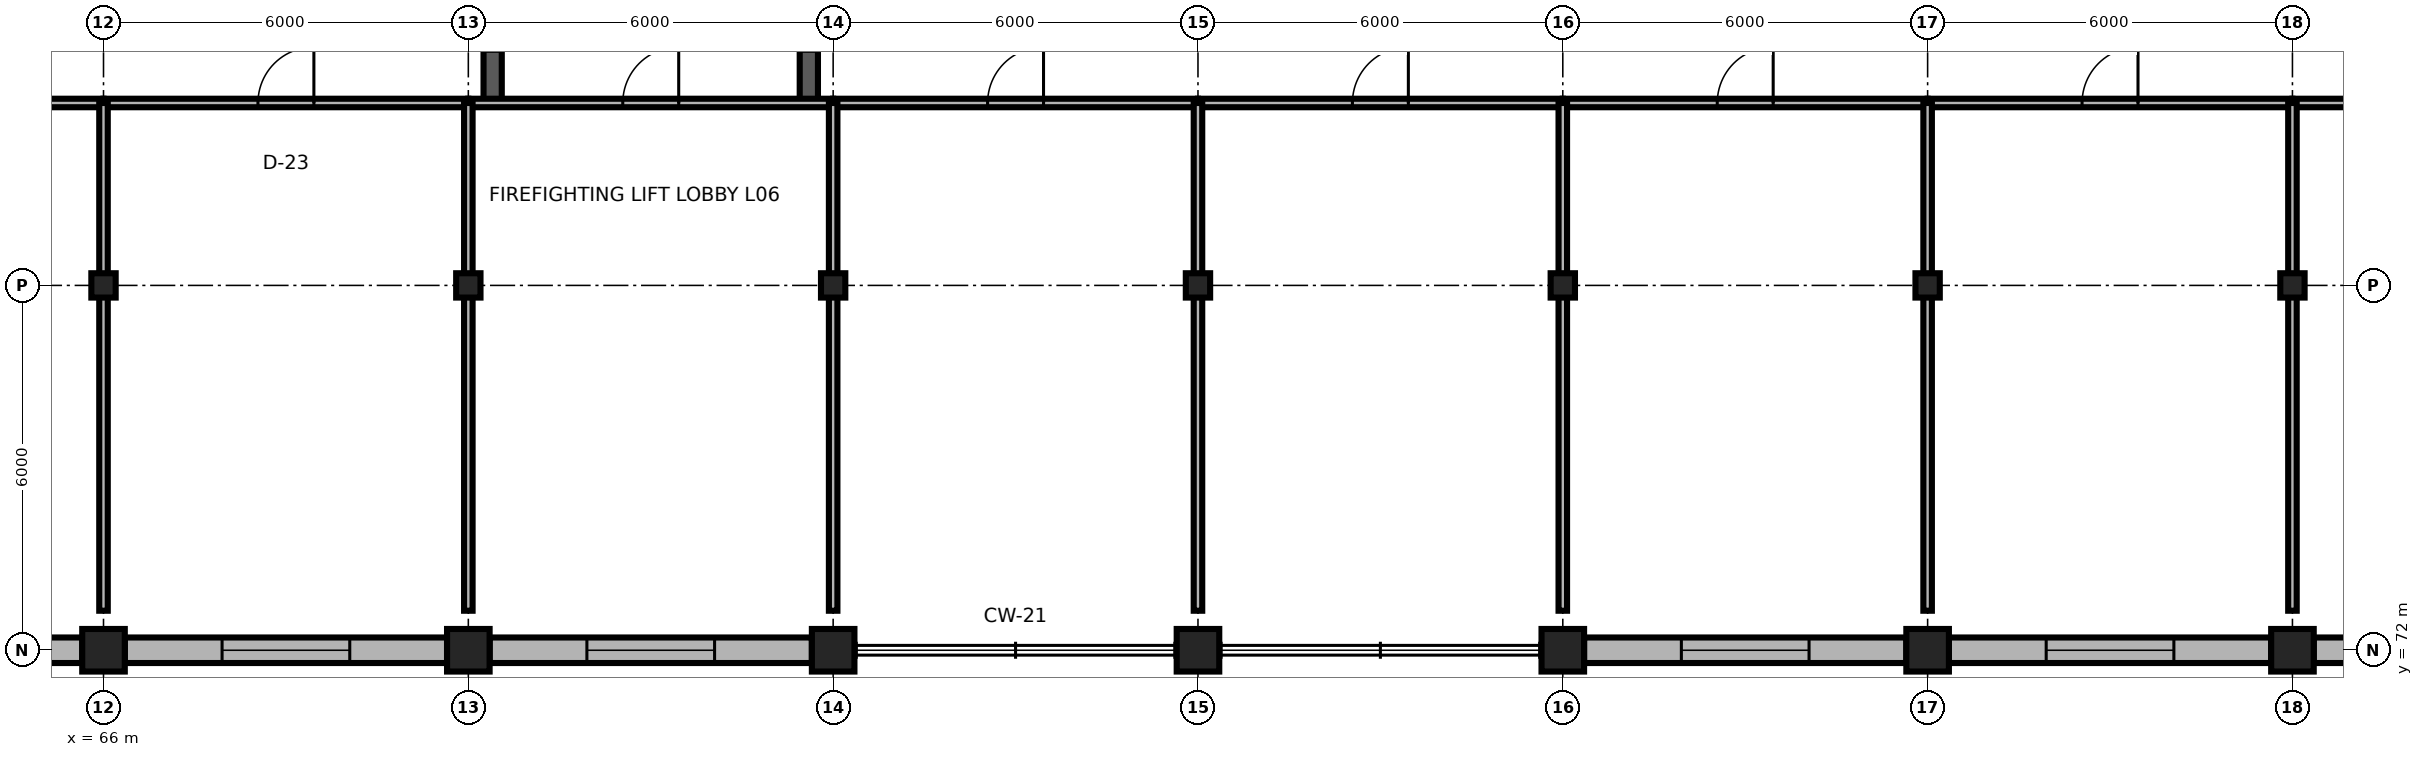
"""IFC4 building model, lengths in metres.
Left out: names, types, materials, properties, quantities, classifications, styles, units other than length and angle.
Written with IfcOpenShell. Run it as: python <this file> out.ifc"""

import sys

from ifc_helpers import new_model, si_unit, direction, frame, frame_2d, origin, origin_2d, place, context, subcontext, project, spatial, rectangle, i_section, extrude, element, fill, save


model = new_model("IFC4")
c1 = context("Model", 3, precision=1e-05, world=origin(), true_north=direction((0.0, 1.0)))
c2 = subcontext(c1, "Body", "Model", "MODEL_VIEW")
j1 = project(units=[si_unit("LENGTHUNIT", "METRE"), si_unit("PLANEANGLEUNIT", "RADIAN")], contexts=[c1])
p1 = place(None, origin())
s1 = spatial("IfcSite", under=j1, at=p1, CompositionType="ELEMENT")
p2 = place(p1, origin())
s2 = spatial("IfcBuilding", under=s1, at=p2, CompositionType="ELEMENT")
p3 = place(p2, frame((0.0, 0.0, 24.9)))
s3 = spatial("IfcBuildingStorey", under=s2, at=p3, CompositionType="ELEMENT", Elevation=24.9)
for number, where, z_axis, x_axis in (
    (1, (66.0, 72.0, 0.0), (0.0, 0.0, 1.0), (1.0, 0.0, 0.0)),
    (2, (72.0, 72.0, 0.0), (0.0, 0.0, 1.0), (1.0, 0.0, 0.0)),
    (3, (78.0, 72.0, 0.0), (0.0, 0.0, 1.0), (1.0, 0.0, 0.0)),
    (4, (84.0, 72.0, 0.0), (0.0, 0.0, 1.0), (1.0, 0.0, 0.0)),
    (5, (90.0, 72.0, 0.0), (0.0, 0.0, 1.0), (1.0, 0.0, 0.0)),
    (6, (96.0, 72.0, 0.0), (0.0, 0.0, 1.0), (1.0, 0.0, 0.0)),
    (7, (102.0, 72.0, 0.0), (0.0, 0.0, 1.0), (1.0, 0.0, 0.0)),
):
    element("IfcColumn", number, at=place(p3, frame(where, z_axis=z_axis, x_axis=x_axis)), inside=s3, PredefinedType="COLUMN", context=c2, shape_type="SweptSolid", body=[
        extrude(rectangle(XDim=0.7, YDim=0.7, at=origin_2d()), origin(), (0.0, 0.0, 1.0), 3.9),
    ])
for number, where, z_axis, x_axis in (
    (8, (66.0, 78.0, 0.0), (0.0, 0.0, 1.0), (1.0, 0.0, 0.0)),
    (9, (72.0, 78.0, 0.0), (0.0, 0.0, 1.0), (1.0, 0.0, 0.0)),
    (10, (78.0, 78.0, 0.0), (0.0, 0.0, 1.0), (1.0, 0.0, 0.0)),
    (11, (84.0, 78.0, 0.0), (0.0, 0.0, 1.0), (1.0, 0.0, 0.0)),
    (12, (90.0, 78.0, 0.0), (0.0, 0.0, 1.0), (1.0, 0.0, 0.0)),
    (13, (96.0, 78.0, 0.0), (0.0, 0.0, 1.0), (1.0, 0.0, 0.0)),
    (14, (102.0, 78.0, 0.0), (0.0, 0.0, 1.0), (1.0, 0.0, 0.0)),
):
    element("IfcColumn", number, at=place(p3, frame(where, z_axis=z_axis, x_axis=x_axis)), inside=s3, PredefinedType="COLUMN", context=c2, shape_type="SweptSolid", body=[
        extrude(i_section(OverallWidth=0.4, OverallDepth=0.4, WebThickness=0.013, FlangeThickness=0.021, FilletRadius=0.022, at=origin_2d()), origin(), (0.0, 0.0, 1.0), 3.9),
    ])
p4 = place(p3, frame((60.35, 72.0, 0.0), z_axis=(0.0, 0.0, 1.0), x_axis=(1.0, 0.0, 0.0)))
e15 = element("IfcWall", 15, at=p4, inside=s3, PredefinedType="SOLIDWALL", context=c2, shape_type="SweptSolid", body=[
    extrude(rectangle(XDim=5.3, YDim=0.42, at=frame_2d((2.65, 0.0))), origin(), (0.0, 0.0, 1.0), 3.32),
])
p5 = place(p4, frame((1.6, 0.0, 0.85)))
e16 = element("IfcOpeningElement", 16, at=p5, cuts=e15, PredefinedType="OPENING", context=c2, shape_type="SweptSolid", body=[
    extrude(rectangle(XDim=2.1, YDim=2.1, at=frame_2d((1.05, 1.05))), frame((0.0, 0.225, 0.0), z_axis=(0.0, -1.0, 0.0), x_axis=(1.0, 0.0, 0.0)), (0.0, 0.0, 1.0), 0.45),
])
p6 = place(p3, frame((66.35, 72.0, 0.0), z_axis=(0.0, 0.0, 1.0), x_axis=(1.0, 0.0, 0.0)))
e17 = element("IfcWall", 17, at=p6, inside=s3, PredefinedType="SOLIDWALL", context=c2, shape_type="SweptSolid", body=[
    extrude(rectangle(XDim=5.3, YDim=0.42, at=frame_2d((2.65, 0.0))), origin(), (0.0, 0.0, 1.0), 3.32),
])
p7 = place(p6, frame((1.6, 0.0, 0.85)))
e18 = element("IfcOpeningElement", 18, at=p7, cuts=e17, PredefinedType="OPENING", context=c2, shape_type="SweptSolid", body=[
    extrude(rectangle(XDim=2.1, YDim=2.1, at=frame_2d((1.05, 1.05))), frame((0.0, 0.225, 0.0), z_axis=(0.0, -1.0, 0.0), x_axis=(1.0, 0.0, 0.0)), (0.0, 0.0, 1.0), 0.45),
])
p8 = place(p3, frame((72.35, 72.0, 0.0), z_axis=(0.0, 0.0, 1.0), x_axis=(1.0, 0.0, 0.0)))
e19 = element("IfcWall", 19, at=p8, inside=s3, PredefinedType="SOLIDWALL", context=c2, shape_type="SweptSolid", body=[
    extrude(rectangle(XDim=5.3, YDim=0.42, at=frame_2d((2.65, 0.0))), origin(), (0.0, 0.0, 1.0), 3.32),
])
p9 = place(p8, frame((1.6, 0.0, 0.85)))
e20 = element("IfcOpeningElement", 20, at=p9, cuts=e19, PredefinedType="OPENING", context=c2, shape_type="SweptSolid", body=[
    extrude(rectangle(XDim=2.1, YDim=2.1, at=frame_2d((1.05, 1.05))), frame((0.0, 0.225, 0.0), z_axis=(0.0, -1.0, 0.0), x_axis=(1.0, 0.0, 0.0)), (0.0, 0.0, 1.0), 0.45),
])
p10 = place(p3, frame((90.35, 72.0, 0.0), z_axis=(0.0, 0.0, 1.0), x_axis=(1.0, 0.0, 0.0)))
e21 = element("IfcWall", 21, at=p10, inside=s3, PredefinedType="SOLIDWALL", context=c2, shape_type="SweptSolid", body=[
    extrude(rectangle(XDim=5.3, YDim=0.42, at=frame_2d((2.65, 0.0))), origin(), (0.0, 0.0, 1.0), 3.32),
])
p11 = place(p10, frame((1.6, 0.0, 0.85)))
e22 = element("IfcOpeningElement", 22, at=p11, cuts=e21, PredefinedType="OPENING", context=c2, shape_type="SweptSolid", body=[
    extrude(rectangle(XDim=2.1, YDim=2.1, at=frame_2d((1.05, 1.05))), frame((0.0, 0.225, 0.0), z_axis=(0.0, -1.0, 0.0), x_axis=(1.0, 0.0, 0.0)), (0.0, 0.0, 1.0), 0.45),
])
p12 = place(p3, frame((96.35, 72.0, 0.0), z_axis=(0.0, 0.0, 1.0), x_axis=(1.0, 0.0, 0.0)))
e23 = element("IfcWall", 23, at=p12, inside=s3, PredefinedType="SOLIDWALL", context=c2, shape_type="SweptSolid", body=[
    extrude(rectangle(XDim=5.3, YDim=0.42, at=frame_2d((2.65, 0.0))), origin(), (0.0, 0.0, 1.0), 3.32),
])
p13 = place(p12, frame((1.6, 0.0, 0.85)))
e24 = element("IfcOpeningElement", 24, at=p13, cuts=e23, PredefinedType="OPENING", context=c2, shape_type="SweptSolid", body=[
    extrude(rectangle(XDim=2.1, YDim=2.1, at=frame_2d((1.05, 1.05))), frame((0.0, 0.225, 0.0), z_axis=(0.0, -1.0, 0.0), x_axis=(1.0, 0.0, 0.0)), (0.0, 0.0, 1.0), 0.45),
])
p14 = place(p3, frame((102.35, 72.0, 0.0), z_axis=(0.0, 0.0, 1.0), x_axis=(1.0, 0.0, 0.0)))
e25 = element("IfcWall", 25, at=p14, inside=s3, PredefinedType="SOLIDWALL", context=c2, shape_type="SweptSolid", body=[
    extrude(rectangle(XDim=5.3, YDim=0.42, at=frame_2d((2.65, 0.0))), origin(), (0.0, 0.0, 1.0), 3.32),
])
p15 = place(p14, frame((1.6, 0.0, 0.85)))
e26 = element("IfcOpeningElement", 26, at=p15, cuts=e25, PredefinedType="OPENING", context=c2, shape_type="SweptSolid", body=[
    extrude(rectangle(XDim=2.1, YDim=2.1, at=frame_2d((1.05, 1.05))), frame((0.0, 0.225, 0.0), z_axis=(0.0, -1.0, 0.0), x_axis=(1.0, 0.0, 0.0)), (0.0, 0.0, 1.0), 0.45),
])
p16 = place(p3, frame((72.4, 81.0, 0.0), z_axis=(0.0, 0.0, 1.0), x_axis=(0.0, 1.0, 0.0)))
e27 = element("IfcWall", 27, at=p16, inside=s3, PredefinedType="SHEAR", context=c2, shape_type="SweptSolid", body=[
    extrude(rectangle(XDim=3.0, YDim=0.3, at=frame_2d((1.5, 0.0))), origin(), (0.0, 0.0, 1.0), 3.74),
])
p17 = place(p16, frame((0.85, 0.0, 0.0)))
e28 = element("IfcOpeningElement", 28, at=p17, cuts=e27, PredefinedType="OPENING", context=c2, shape_type="SweptSolid", body=[
    extrude(rectangle(XDim=1.3, YDim=2.2, at=frame_2d((0.65, 1.1))), frame((0.0, 0.165, 0.0), z_axis=(0.0, -1.0, 0.0), x_axis=(1.0, 0.0, 0.0)), (0.0, 0.0, 1.0), 0.33),
])
p18 = place(p3, frame((77.6, 81.0, 0.0), z_axis=(0.0, 0.0, 1.0), x_axis=(0.0, 1.0, 0.0)))
e29 = element("IfcWall", 29, at=p18, inside=s3, PredefinedType="SHEAR", context=c2, shape_type="SweptSolid", body=[
    extrude(rectangle(XDim=3.0, YDim=0.3, at=frame_2d((1.5, 0.0))), origin(), (0.0, 0.0, 1.0), 3.74),
])
p19 = place(p18, frame((0.85, 0.0, 0.0)))
e30 = element("IfcOpeningElement", 30, at=p19, cuts=e29, PredefinedType="OPENING", context=c2, shape_type="SweptSolid", body=[
    extrude(rectangle(XDim=1.3, YDim=2.2, at=frame_2d((0.65, 1.1))), frame((0.0, 0.165, 0.0), z_axis=(0.0, -1.0, 0.0), x_axis=(1.0, 0.0, 0.0)), (0.0, 0.0, 1.0), 0.33),
])
p20 = place(p3, frame((60.0, 81.0, 0.0), z_axis=(0.0, 0.0, 1.0), x_axis=(1.0, 0.0, 0.0)))
e31 = element("IfcWall", 31, at=p20, inside=s3, PredefinedType="PARTITIONING", context=c2, shape_type="SweptSolid", body=[
    extrude(rectangle(XDim=6.0, YDim=0.14, at=frame_2d((3.0, 0.0))), origin(), (0.0, 0.0, 1.0), 3.74),
])
p21 = place(p20, frame((2.54, 0.0, 0.0)))
e32 = element("IfcOpeningElement", 32, at=p21, cuts=e31, PredefinedType="OPENING", context=c2, shape_type="SweptSolid", body=[
    extrude(rectangle(XDim=0.92, YDim=2.15, at=frame_2d((0.46, 1.075))), frame((0.0, 0.085, 0.0), z_axis=(0.0, -1.0, 0.0), x_axis=(1.0, 0.0, 0.0)), (0.0, 0.0, 1.0), 0.17),
])
p22 = place(p3, frame((66.0, 81.0, 0.0), z_axis=(0.0, 0.0, 1.0), x_axis=(1.0, 0.0, 0.0)))
e33 = element("IfcWall", 33, at=p22, inside=s3, PredefinedType="PARTITIONING", context=c2, shape_type="SweptSolid", body=[
    extrude(rectangle(XDim=6.0, YDim=0.14, at=frame_2d((3.0, 0.0))), origin(), (0.0, 0.0, 1.0), 3.74),
])
p23 = place(p22, frame((2.54, 0.0, 0.0)))
e34 = element("IfcOpeningElement", 34, at=p23, cuts=e33, PredefinedType="OPENING", context=c2, shape_type="SweptSolid", body=[
    extrude(rectangle(XDim=0.92, YDim=2.15, at=frame_2d((0.46, 1.075))), frame((0.0, 0.085, 0.0), z_axis=(0.0, -1.0, 0.0), x_axis=(1.0, 0.0, 0.0)), (0.0, 0.0, 1.0), 0.17),
])
p24 = place(p3, frame((72.0, 81.0, 0.0), z_axis=(0.0, 0.0, 1.0), x_axis=(1.0, 0.0, 0.0)))
e35 = element("IfcWall", 35, at=p24, inside=s3, PredefinedType="PARTITIONING", context=c2, shape_type="SweptSolid", body=[
    extrude(rectangle(XDim=6.0, YDim=0.14, at=frame_2d((3.0, 0.0))), origin(), (0.0, 0.0, 1.0), 3.74),
])
p25 = place(p24, frame((2.54, 0.0, 0.0)))
e36 = element("IfcOpeningElement", 36, at=p25, cuts=e35, PredefinedType="OPENING", context=c2, shape_type="SweptSolid", body=[
    extrude(rectangle(XDim=0.92, YDim=2.15, at=frame_2d((0.46, 1.075))), frame((0.0, 0.085, 0.0), z_axis=(0.0, -1.0, 0.0), x_axis=(1.0, 0.0, 0.0)), (0.0, 0.0, 1.0), 0.17),
])
p26 = place(p3, frame((78.0, 81.0, 0.0), z_axis=(0.0, 0.0, 1.0), x_axis=(1.0, 0.0, 0.0)))
e37 = element("IfcWall", 37, at=p26, inside=s3, PredefinedType="PARTITIONING", context=c2, shape_type="SweptSolid", body=[
    extrude(rectangle(XDim=6.0, YDim=0.14, at=frame_2d((3.0, 0.0))), origin(), (0.0, 0.0, 1.0), 3.74),
])
p27 = place(p26, frame((2.54, 0.0, 0.0)))
e38 = element("IfcOpeningElement", 38, at=p27, cuts=e37, PredefinedType="OPENING", context=c2, shape_type="SweptSolid", body=[
    extrude(rectangle(XDim=0.92, YDim=2.15, at=frame_2d((0.46, 1.075))), frame((0.0, 0.085, 0.0), z_axis=(0.0, -1.0, 0.0), x_axis=(1.0, 0.0, 0.0)), (0.0, 0.0, 1.0), 0.17),
])
p28 = place(p3, frame((84.0, 81.0, 0.0), z_axis=(0.0, 0.0, 1.0), x_axis=(1.0, 0.0, 0.0)))
e39 = element("IfcWall", 39, at=p28, inside=s3, PredefinedType="PARTITIONING", context=c2, shape_type="SweptSolid", body=[
    extrude(rectangle(XDim=6.0, YDim=0.14, at=frame_2d((3.0, 0.0))), origin(), (0.0, 0.0, 1.0), 3.74),
])
p29 = place(p28, frame((2.54, 0.0, 0.0)))
e40 = element("IfcOpeningElement", 40, at=p29, cuts=e39, PredefinedType="OPENING", context=c2, shape_type="SweptSolid", body=[
    extrude(rectangle(XDim=0.92, YDim=2.15, at=frame_2d((0.46, 1.075))), frame((0.0, 0.085, 0.0), z_axis=(0.0, -1.0, 0.0), x_axis=(1.0, 0.0, 0.0)), (0.0, 0.0, 1.0), 0.17),
])
p30 = place(p3, frame((90.0, 81.0, 0.0), z_axis=(0.0, 0.0, 1.0), x_axis=(1.0, 0.0, 0.0)))
e41 = element("IfcWall", 41, at=p30, inside=s3, PredefinedType="PARTITIONING", context=c2, shape_type="SweptSolid", body=[
    extrude(rectangle(XDim=6.0, YDim=0.14, at=frame_2d((3.0, 0.0))), origin(), (0.0, 0.0, 1.0), 3.74),
])
p31 = place(p30, frame((2.54, 0.0, 0.0)))
e42 = element("IfcOpeningElement", 42, at=p31, cuts=e41, PredefinedType="OPENING", context=c2, shape_type="SweptSolid", body=[
    extrude(rectangle(XDim=0.92, YDim=2.15, at=frame_2d((0.46, 1.075))), frame((0.0, 0.085, 0.0), z_axis=(0.0, -1.0, 0.0), x_axis=(1.0, 0.0, 0.0)), (0.0, 0.0, 1.0), 0.17),
])
p32 = place(p3, frame((96.0, 81.0, 0.0), z_axis=(0.0, 0.0, 1.0), x_axis=(1.0, 0.0, 0.0)))
e43 = element("IfcWall", 43, at=p32, inside=s3, PredefinedType="PARTITIONING", context=c2, shape_type="SweptSolid", body=[
    extrude(rectangle(XDim=6.0, YDim=0.14, at=frame_2d((3.0, 0.0))), origin(), (0.0, 0.0, 1.0), 3.74),
])
p33 = place(p32, frame((2.54, 0.0, 0.0)))
e44 = element("IfcOpeningElement", 44, at=p33, cuts=e43, PredefinedType="OPENING", context=c2, shape_type="SweptSolid", body=[
    extrude(rectangle(XDim=0.92, YDim=2.15, at=frame_2d((0.46, 1.075))), frame((0.0, 0.085, 0.0), z_axis=(0.0, -1.0, 0.0), x_axis=(1.0, 0.0, 0.0)), (0.0, 0.0, 1.0), 0.17),
])
p34 = place(p3, frame((102.0, 81.0, 0.0), z_axis=(0.0, 0.0, 1.0), x_axis=(1.0, 0.0, 0.0)))
e45 = element("IfcWall", 45, at=p34, inside=s3, PredefinedType="PARTITIONING", context=c2, shape_type="SweptSolid", body=[
    extrude(rectangle(XDim=6.0, YDim=0.14, at=frame_2d((3.0, 0.0))), origin(), (0.0, 0.0, 1.0), 3.74),
])
p35 = place(p34, frame((2.54, 0.0, 0.0)))
e46 = element("IfcOpeningElement", 46, at=p35, cuts=e45, PredefinedType="OPENING", context=c2, shape_type="SweptSolid", body=[
    extrude(rectangle(XDim=0.92, YDim=2.15, at=frame_2d((0.46, 1.075))), frame((0.0, 0.085, 0.0), z_axis=(0.0, -1.0, 0.0), x_axis=(1.0, 0.0, 0.0)), (0.0, 0.0, 1.0), 0.17),
])
for number, where, z_axis, x_axis in (
    (47, (66.0, 72.65, 0.0), (0.0, 0.0, 1.0), (0.0, 1.0, 0.0)),
    (48, (72.0, 72.65, 0.0), (0.0, 0.0, 1.0), (0.0, 1.0, 0.0)),
    (49, (78.0, 72.65, 0.0), (0.0, 0.0, 1.0), (0.0, 1.0, 0.0)),
    (50, (84.0, 72.65, 0.0), (0.0, 0.0, 1.0), (0.0, 1.0, 0.0)),
    (51, (90.0, 72.65, 0.0), (0.0, 0.0, 1.0), (0.0, 1.0, 0.0)),
    (52, (96.0, 72.65, 0.0), (0.0, 0.0, 1.0), (0.0, 1.0, 0.0)),
    (53, (102.0, 72.65, 0.0), (0.0, 0.0, 1.0), (0.0, 1.0, 0.0)),
):
    element("IfcWall", number, at=place(p3, frame(where, z_axis=z_axis, x_axis=x_axis)), inside=s3, PredefinedType="PARTITIONING", context=c2, shape_type="SweptSolid", body=[
        extrude(rectangle(XDim=8.35, YDim=0.14, at=frame_2d((4.175, 0.0))), origin(), (0.0, 0.0, 1.0), 3.352),
    ])
p36 = place(p7, origin())
e54 = element("IfcWindow", 54, at=p36, inside=s3, PartitioningType="SINGLE_PANEL", PredefinedType="WINDOW", context=c2, shape_type="SweptSolid", body=[
    extrude(rectangle(XDim=2.1, YDim=2.1, at=frame_2d((1.05, 1.05))), frame((0.0, 0.03, 0.0), z_axis=(0.0, -1.0, 0.0), x_axis=(1.0, 0.0, 0.0)), (0.0, 0.0, 1.0), 0.06),
])
fill(e18, e54)
p37 = place(p9, origin())
e55 = element("IfcWindow", 55, at=p37, inside=s3, PartitioningType="SINGLE_PANEL", PredefinedType="WINDOW", context=c2, shape_type="SweptSolid", body=[
    extrude(rectangle(XDim=2.1, YDim=2.1, at=frame_2d((1.05, 1.05))), frame((0.0, 0.03, 0.0), z_axis=(0.0, -1.0, 0.0), x_axis=(1.0, 0.0, 0.0)), (0.0, 0.0, 1.0), 0.06),
])
fill(e20, e55)
p38 = place(p11, origin())
e56 = element("IfcWindow", 56, at=p38, inside=s3, PartitioningType="SINGLE_PANEL", PredefinedType="WINDOW", context=c2, shape_type="SweptSolid", body=[
    extrude(rectangle(XDim=2.1, YDim=2.1, at=frame_2d((1.05, 1.05))), frame((0.0, 0.03, 0.0), z_axis=(0.0, -1.0, 0.0), x_axis=(1.0, 0.0, 0.0)), (0.0, 0.0, 1.0), 0.06),
])
fill(e22, e56)
p39 = place(p13, origin())
e57 = element("IfcWindow", 57, at=p39, inside=s3, PartitioningType="SINGLE_PANEL", PredefinedType="WINDOW", context=c2, shape_type="SweptSolid", body=[
    extrude(rectangle(XDim=2.1, YDim=2.1, at=frame_2d((1.05, 1.05))), frame((0.0, 0.03, 0.0), z_axis=(0.0, -1.0, 0.0), x_axis=(1.0, 0.0, 0.0)), (0.0, 0.0, 1.0), 0.06),
])
fill(e24, e57)
p40 = place(p23, origin())
e58 = element("IfcDoor", 58, at=p40, inside=s3, OperationType="SINGLE_SWING_RIGHT", PredefinedType="DOOR", context=c2, shape_type="SweptSolid", body=[
    extrude(rectangle(XDim=0.92, YDim=2.15, at=frame_2d((0.46, 1.075))), frame((0.0, 0.025, 0.0), z_axis=(0.0, -1.0, 0.0), x_axis=(1.0, 0.0, 0.0)), (0.0, 0.0, 1.0), 0.05),
])
fill(e34, e58)
p41 = place(p25, origin())
e59 = element("IfcDoor", 59, at=p41, inside=s3, OperationType="SINGLE_SWING_RIGHT", PredefinedType="DOOR", context=c2, shape_type="SweptSolid", body=[
    extrude(rectangle(XDim=0.92, YDim=2.15, at=frame_2d((0.46, 1.075))), frame((0.0, 0.025, 0.0), z_axis=(0.0, -1.0, 0.0), x_axis=(1.0, 0.0, 0.0)), (0.0, 0.0, 1.0), 0.05),
])
fill(e36, e59)
p42 = place(p27, origin())
e60 = element("IfcDoor", 60, at=p42, inside=s3, OperationType="SINGLE_SWING_RIGHT", PredefinedType="DOOR", context=c2, shape_type="SweptSolid", body=[
    extrude(rectangle(XDim=0.92, YDim=2.15, at=frame_2d((0.46, 1.075))), frame((0.0, 0.025, 0.0), z_axis=(0.0, -1.0, 0.0), x_axis=(1.0, 0.0, 0.0)), (0.0, 0.0, 1.0), 0.05),
])
fill(e38, e60)
p43 = place(p29, origin())
e61 = element("IfcDoor", 61, at=p43, inside=s3, OperationType="SINGLE_SWING_RIGHT", PredefinedType="DOOR", context=c2, shape_type="SweptSolid", body=[
    extrude(rectangle(XDim=0.92, YDim=2.15, at=frame_2d((0.46, 1.075))), frame((0.0, 0.025, 0.0), z_axis=(0.0, -1.0, 0.0), x_axis=(1.0, 0.0, 0.0)), (0.0, 0.0, 1.0), 0.05),
])
fill(e40, e61)
p44 = place(p31, origin())
e62 = element("IfcDoor", 62, at=p44, inside=s3, OperationType="SINGLE_SWING_RIGHT", PredefinedType="DOOR", context=c2, shape_type="SweptSolid", body=[
    extrude(rectangle(XDim=0.92, YDim=2.15, at=frame_2d((0.46, 1.075))), frame((0.0, 0.025, 0.0), z_axis=(0.0, -1.0, 0.0), x_axis=(1.0, 0.0, 0.0)), (0.0, 0.0, 1.0), 0.05),
])
fill(e42, e62)
p45 = place(p33, origin())
e63 = element("IfcDoor", 63, at=p45, inside=s3, OperationType="SINGLE_SWING_RIGHT", PredefinedType="DOOR", context=c2, shape_type="SweptSolid", body=[
    extrude(rectangle(XDim=0.92, YDim=2.15, at=frame_2d((0.46, 1.075))), frame((0.0, 0.025, 0.0), z_axis=(0.0, -1.0, 0.0), x_axis=(1.0, 0.0, 0.0)), (0.0, 0.0, 1.0), 0.05),
])
fill(e44, e63)
save(model, sys.argv[1])
